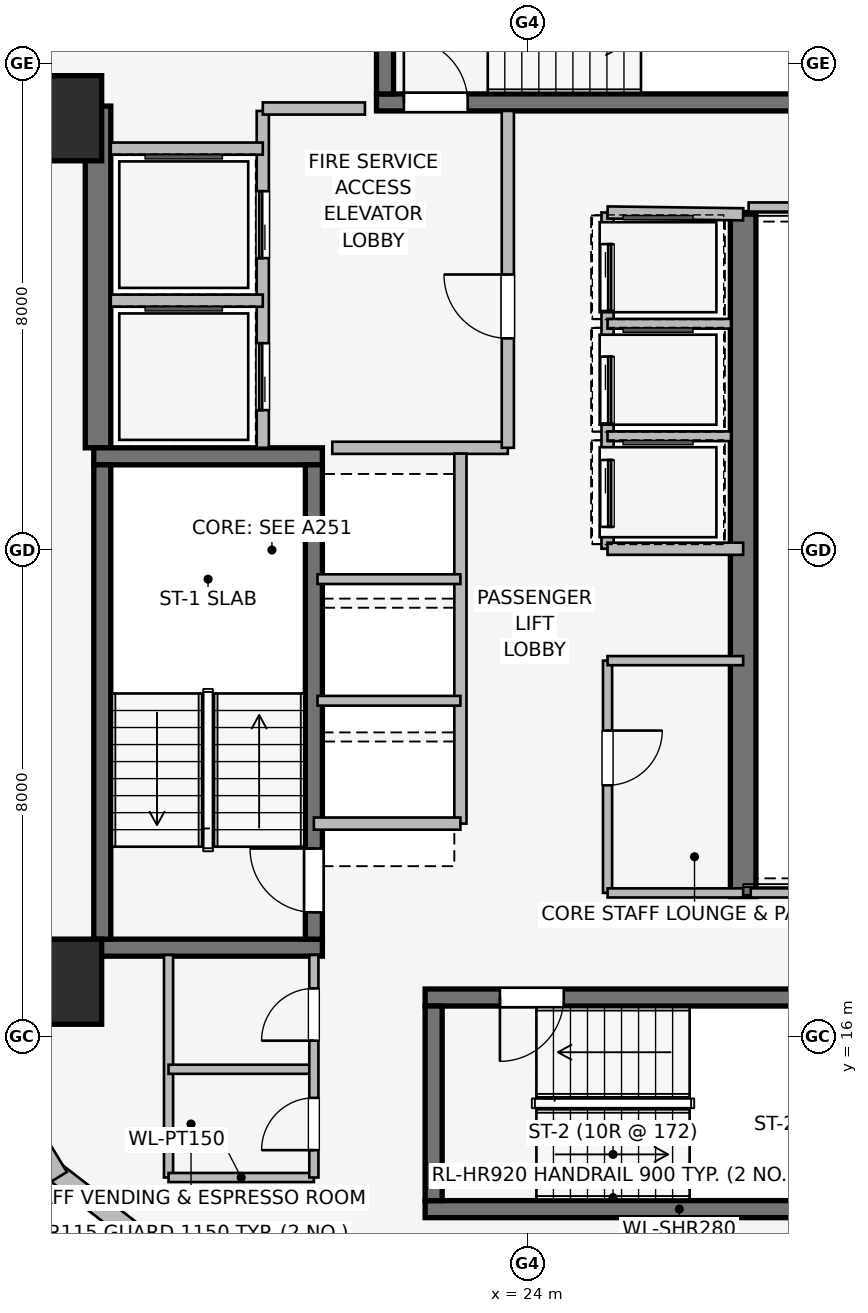
"""IFC4 building model, lengths in metres.
Left out: names, types, materials, properties, quantities, classifications, styles, units other than length and angle.
Written with IfcOpenShell. Run it as: python <this file> out.ifc"""

import sys

from ifc_helpers import new_model, si_unit, direction, frame, frame_2d, origin, origin_2d, place, context, subcontext, project, spatial, rectangle, extrude, element, fill, save


model = new_model("IFC4")
c1 = context("Model", 3, precision=1e-05, world=origin(), true_north=direction((0.0, 1.0)))
c2 = subcontext(c1, "Body", "Model", "MODEL_VIEW")
j1 = project(units=[si_unit("LENGTHUNIT", "METRE"), si_unit("PLANEANGLEUNIT", "RADIAN")], contexts=[c1])
p1 = place(None, origin())
s1 = spatial("IfcSite", under=j1, at=p1, CompositionType="ELEMENT")
p2 = place(p1, origin())
s2 = spatial("IfcBuilding", under=s1, at=p2, CompositionType="ELEMENT")
p3 = place(p2, frame((0.0, 0.0, 180.9)))
s3 = spatial("IfcBuildingStorey", under=s2, at=p3, CompositionType="ELEMENT", Elevation=180.9)
p4 = place(p3, frame((16.94, 25.68, 0.0), z_axis=(0.0, 0.0, 1.0), x_axis=(0.0, 1.0, 0.0)))
e1 = element("IfcWall", 1, at=p4, inside=s3, PredefinedType="SHEAR", context=c2, shape_type="SweptSolid", body=[
    extrude(rectangle(XDim=5.62, YDim=0.42, at=frame_2d((2.81, 0.0))), origin(), (0.0, 0.0, 1.0), 3.45),
])
p5 = place(p3, frame((27.55, 29.55, 0.0), z_axis=(0.0, 0.0, 1.0), x_axis=(0.0, -1.0, 0.0)))
e2 = element("IfcWall", 2, at=p5, inside=s3, PredefinedType="SHEAR", context=c2, shape_type="SweptSolid", body=[
    extrude(rectangle(XDim=11.25, YDim=0.42, at=frame_2d((5.625, 0.0))), origin(), (0.0, 0.0, 1.0), 3.45),
])
for number, where, z_axis, x_axis in (
    (3, (16.87, 17.46, 0.0), (0.0, 0.0, 1.0), (1.0, 0.0, 0.0)),
    (4, (20.63, 25.54, 0.0), (0.0, 0.0, 1.0), (-1.0, 0.0, 0.0)),
):
    element("IfcWall", number, at=place(p3, frame(where, z_axis=z_axis, x_axis=x_axis)), inside=s3, PredefinedType="SHEAR", context=c2, shape_type="SweptSolid", body=[
        extrude(rectangle(XDim=3.76, YDim=0.28, at=frame_2d((1.88, 0.0))), origin(), (0.0, 0.0, 1.0), 3.45),
    ])
p6 = place(p3, frame((17.01, 25.4, 0.0), z_axis=(0.0, 0.0, 1.0), x_axis=(0.0, -1.0, 0.0)))
e5 = element("IfcWall", 5, at=p6, inside=s3, PredefinedType="SHEAR", context=c2, shape_type="SweptSolid", body=[
    extrude(rectangle(XDim=7.8, YDim=0.28, at=frame_2d((3.9, 0.0))), origin(), (0.0, 0.0, 1.0), 3.45),
])
p7 = place(p3, frame((20.49, 17.6, 0.0), z_axis=(0.0, 0.0, 1.0), x_axis=(0.0, 1.0, 0.0)))
e6 = element("IfcWall", 6, at=p7, inside=s3, PredefinedType="SHEAR", context=c2, shape_type="SweptSolid", body=[
    extrude(rectangle(XDim=7.8, YDim=0.28, at=frame_2d((3.9, 0.0))), origin(), (0.0, 0.0, 1.0), 3.45),
])
p8 = place(p7, frame((0.44, 0.0, 0.0)))
e7 = element("IfcOpeningElement", 7, at=p8, cuts=e6, PredefinedType="OPENING", context=c2, shape_type="SweptSolid", body=[
    extrude(rectangle(XDim=1.05, YDim=2.0, at=frame_2d((0.525, 1.0))), frame((0.0, 0.15, 0.0), z_axis=(0.0, -1.0, 0.0), x_axis=(1.0, 0.0, 0.0)), (0.0, 0.0, 1.0), 0.3),
])
p9 = place(p3, frame((22.32, 13.16, 0.0), z_axis=(0.0, 0.0, 1.0), x_axis=(1.0, 0.0, 0.0)))
e8 = element("IfcWall", 8, at=p9, inside=s3, PredefinedType="SHEAR", context=c2, shape_type="SweptSolid", body=[
    extrude(rectangle(XDim=8.36, YDim=0.28, at=frame_2d((4.18, 0.0))), origin(), (0.0, 0.0, 1.0), 3.45),
])
p10 = place(p3, frame((30.68, 16.64, 0.0), z_axis=(0.0, 0.0, 1.0), x_axis=(-1.0, 0.0, 0.0)))
e9 = element("IfcWall", 9, at=p10, inside=s3, PredefinedType="SHEAR", context=c2, shape_type="SweptSolid", body=[
    extrude(rectangle(XDim=8.36, YDim=0.28, at=frame_2d((4.18, 0.0))), origin(), (0.0, 0.0, 1.0), 3.45),
])
p11 = place(p10, frame((6.08, 0.0, 0.0)))
e10 = element("IfcOpeningElement", 10, at=p11, cuts=e9, PredefinedType="OPENING", context=c2, shape_type="SweptSolid", body=[
    extrude(rectangle(XDim=1.05, YDim=2.0, at=frame_2d((0.525, 1.0))), frame((0.0, 0.15, 0.0), z_axis=(0.0, -1.0, 0.0), x_axis=(1.0, 0.0, 0.0)), (0.0, 0.0, 1.0), 0.3),
])
p12 = place(p3, frame((22.46, 16.5, 0.0), z_axis=(0.0, 0.0, 1.0), x_axis=(0.0, -1.0, 0.0)))
e11 = element("IfcWall", 11, at=p12, inside=s3, PredefinedType="SHEAR", context=c2, shape_type="SweptSolid", body=[
    extrude(rectangle(XDim=3.2, YDim=0.28, at=frame_2d((1.6, 0.0))), origin(), (0.0, 0.0, 1.0), 3.45),
])
p13 = place(p3, frame((21.52, 31.36, 0.0), z_axis=(0.0, 0.0, 1.0), x_axis=(1.0, 0.0, 0.0)))
e12 = element("IfcWall", 12, at=p13, inside=s3, PredefinedType="SHEAR", context=c2, shape_type="SweptSolid", body=[
    extrude(rectangle(XDim=8.36, YDim=0.28, at=frame_2d((4.18, 0.0))), origin(), (0.0, 0.0, 1.0), 3.45),
])
p14 = place(p13, frame((0.45, 0.0, 0.0)))
e13 = element("IfcOpeningElement", 13, at=p14, cuts=e12, PredefinedType="OPENING", context=c2, shape_type="SweptSolid", body=[
    extrude(rectangle(XDim=1.05, YDim=2.0, at=frame_2d((0.525, 1.0))), frame((0.0, 0.15, 0.0), z_axis=(0.0, -1.0, 0.0), x_axis=(1.0, 0.0, 0.0)), (0.0, 0.0, 1.0), 0.3),
])
p15 = place(p3, frame((21.66, 34.7, 0.0), z_axis=(0.0, 0.0, 1.0), x_axis=(0.0, -1.0, 0.0)))
e14 = element("IfcWall", 14, at=p15, inside=s3, PredefinedType="SHEAR", context=c2, shape_type="SweptSolid", body=[
    extrude(rectangle(XDim=3.2, YDim=0.28, at=frame_2d((1.6, 0.0))), origin(), (0.0, 0.0, 1.0), 3.45),
])
for number, where, z_axis, x_axis in (
    (15, (16.3, 16.9, 0.0), (0.0, 0.0, 1.0), (1.0, 0.0, 0.0)),
    (16, (16.3, 31.1, 0.0), (0.0, 0.0, 1.0), (1.0, 0.0, 0.0)),
):
    element("IfcColumn", number, at=place(p3, frame(where, z_axis=z_axis, x_axis=x_axis)), inside=s3, PredefinedType="COLUMN", context=c2, shape_type="SweptSolid", body=[
        extrude(rectangle(XDim=1.4, YDim=1.4, at=origin_2d()), origin(), (0.0, 0.0, 1.0), 3.45),
    ])
p16 = place(p3, frame((17.489, 12.8, 0.0), z_axis=(0.0, 0.0, 1.0), x_axis=(-0.791409877269, 0.611285862884, 0.0)))
e17 = element("IfcWall", 17, at=p16, inside=s3, PredefinedType="STANDARD", context=c2, shape_type="SweptSolid", body=[
    extrude(rectangle(XDim=1.677, YDim=0.33, at=frame_2d((0.838, 0.0))), origin(), (0.0, 0.0, 1.0), 3.19),
])
p17 = place(p3, frame((16.288, 13.685, 0.0), z_axis=(0.0, 0.0, 1.0), x_axis=(-0.520325409202, 0.853968072318, 0.0)))
e18 = element("IfcWall", 18, at=p17, inside=s3, PredefinedType="STANDARD", context=c2, shape_type="SweptSolid", body=[
    extrude(rectangle(XDim=1.678, YDim=0.33, at=frame_2d((0.839, 0.0))), origin(), (0.0, 0.0, 1.0), 3.19),
])
p18 = place(p3, frame((19.65, 25.68, 0.0), z_axis=(0.0, 0.0, 1.0), x_axis=(0.0, 1.0, 0.0)))
e19 = element("IfcWall", 19, at=p18, inside=s3, PredefinedType="PARTITIONING", context=c2, shape_type="SweptSolid", body=[
    extrude(rectangle(XDim=5.54, YDim=0.2, at=frame_2d((2.77, 0.0))), origin(), (0.0, 0.0, 1.0), 3.19),
])
p19 = place(p18, frame((0.62, 0.0, 0.0)))
e20 = element("IfcOpeningElement", 20, at=p19, cuts=e19, PredefinedType="OPENING", context=c2, shape_type="SweptSolid", body=[
    extrude(rectangle(XDim=1.1, YDim=2.2, at=frame_2d((0.55, 1.1))), frame((0.0, 0.11, 0.0), z_axis=(0.0, -1.0, 0.0), x_axis=(1.0, 0.0, 0.0)), (0.0, 0.0, 1.0), 0.22),
])
p20 = place(p18, frame((3.12, 0.0, 0.0)))
e21 = element("IfcOpeningElement", 21, at=p20, cuts=e19, PredefinedType="OPENING", context=c2, shape_type="SweptSolid", body=[
    extrude(rectangle(XDim=1.1, YDim=2.2, at=frame_2d((0.55, 1.1))), frame((0.0, 0.11, 0.0), z_axis=(0.0, -1.0, 0.0), x_axis=(1.0, 0.0, 0.0)), (0.0, 0.0, 1.0), 0.22),
])
p21 = place(p3, frame((20.793, 25.68, 0.0), z_axis=(0.0, 0.0, 1.0), x_axis=(1.0, 0.0, 0.0)))
e22 = element("IfcWall", 22, at=p21, inside=s3, PredefinedType="PARTITIONING", context=c2, shape_type="SweptSolid", body=[
    extrude(rectangle(XDim=2.887, YDim=0.2, at=frame_2d((1.443, 0.0))), origin(), (0.0, 0.0, 1.0), 3.19),
])
p22 = place(p3, frame((23.68, 25.68, 0.0), z_axis=(0.0, 0.0, 1.0), x_axis=(0.0, 1.0, 0.0)))
e23 = element("IfcWall", 23, at=p22, inside=s3, PredefinedType="PARTITIONING", context=c2, shape_type="SweptSolid", body=[
    extrude(rectangle(XDim=5.54, YDim=0.2, at=frame_2d((2.77, 0.0))), origin(), (0.0, 0.0, 1.0), 3.19),
])
p23 = place(p22, frame((1.8, 0.0, 0.0)))
e24 = element("IfcOpeningElement", 24, at=p23, cuts=e23, PredefinedType="OPENING", context=c2, shape_type="SweptSolid", body=[
    extrude(rectangle(XDim=1.05, YDim=2.0, at=frame_2d((0.525, 1.0))), frame((0.0, 0.11, 0.0), z_axis=(0.0, -1.0, 0.0), x_axis=(1.0, 0.0, 0.0)), (0.0, 0.0, 1.0), 0.22),
])
p24 = place(p3, frame((21.33, 31.26, 0.0), z_axis=(0.0, 0.0, 1.0), x_axis=(-1.0, 0.0, 0.0)))
e25 = element("IfcWall", 25, at=p24, inside=s3, PredefinedType="PARTITIONING", context=c2, shape_type="SweptSolid", body=[
    extrude(rectangle(XDim=1.68, YDim=0.2, at=frame_2d((0.84, 0.0))), origin(), (0.0, 0.0, 1.0), 3.19),
])
p25 = place(p3, frame((17.15, 28.1, 0.0), z_axis=(0.0, 0.0, 1.0), x_axis=(1.0, 0.0, 0.0)))
e26 = element("IfcWall", 26, at=p25, inside=s3, PredefinedType="PARTITIONING", context=c2, shape_type="SweptSolid", body=[
    extrude(rectangle(XDim=2.5, YDim=0.2, at=frame_2d((1.25, 0.0))), origin(), (0.0, 0.0, 1.0), 3.19),
])
p26 = place(p3, frame((19.65, 30.6, 0.0), z_axis=(0.0, 0.0, 1.0), x_axis=(-1.0, 0.0, 0.0)))
e27 = element("IfcWall", 27, at=p26, inside=s3, PredefinedType="PARTITIONING", context=c2, shape_type="SweptSolid", body=[
    extrude(rectangle(XDim=2.5, YDim=0.2, at=frame_2d((1.25, 0.0))), origin(), (0.0, 0.0, 1.0), 2.09),
])
p27 = place(p3, frame((22.9, 19.5, 0.0), z_axis=(0.0, 0.0, 1.0), x_axis=(0.0, 1.0, 0.0)))
e28 = element("IfcWall", 28, at=p27, inside=s3, PredefinedType="PARTITIONING", context=c2, shape_type="SweptSolid", body=[
    extrude(rectangle(XDim=6.085, YDim=0.2, at=frame_2d((3.042, 0.0))), origin(), (0.0, 0.0, 1.0), 3.19),
])
p28 = place(p3, frame((20.49, 19.5, 0.0), z_axis=(0.0, 0.0, 1.0), x_axis=(1.0, 0.0, 0.0)))
e29 = element("IfcWall", 29, at=p28, inside=s3, PredefinedType="PARTITIONING", context=c2, shape_type="SweptSolid", body=[
    extrude(rectangle(XDim=2.41, YDim=0.2, at=frame_2d((1.205, 0.0))), origin(), (0.0, 0.0, 1.0), 2.09),
])
for number, where, z_axis, x_axis in (
    (30, (20.55, 21.52, 0.0), (0.0, 0.0, 1.0), (1.0, 0.0, 0.0)),
    (31, (20.55, 23.52, 0.0), (0.0, 0.0, 1.0), (1.0, 0.0, 0.0)),
):
    element("IfcWall", number, at=place(p3, frame(where, z_axis=z_axis, x_axis=x_axis)), inside=s3, PredefinedType="PARTITIONING", context=c2, shape_type="SweptSolid", body=[
        extrude(rectangle(XDim=2.35, YDim=0.16, at=frame_2d((1.175, 0.0))), origin(), (0.0, 0.0, 1.0), 3.19),
    ])
p29 = place(p3, frame((25.32, 29.55, 0.0), z_axis=(0.0, 0.0, 1.0), x_axis=(0.0, -1.0, 0.0)))
e32 = element("IfcWall", 32, at=p29, inside=s3, PredefinedType="PARTITIONING", context=c2, shape_type="SweptSolid", body=[
    extrude(rectangle(XDim=5.53, YDim=0.2, at=frame_2d((2.765, 0.0))), origin(), (0.0, 0.0, 1.0), 3.19),
])
p30 = place(p29, frame((0.52, 0.0, 0.0)))
e33 = element("IfcOpeningElement", 33, at=p30, cuts=e32, PredefinedType="OPENING", context=c2, shape_type="SweptSolid", body=[
    extrude(rectangle(XDim=1.1, YDim=2.2, at=frame_2d((0.55, 1.1))), frame((0.0, 0.11, 0.0), z_axis=(0.0, -1.0, 0.0), x_axis=(1.0, 0.0, 0.0)), (0.0, 0.0, 1.0), 0.22),
])
p31 = place(p29, frame((2.37, 0.0, 0.0)))
e34 = element("IfcOpeningElement", 34, at=p31, cuts=e32, PredefinedType="OPENING", context=c2, shape_type="SweptSolid", body=[
    extrude(rectangle(XDim=1.1, YDim=2.2, at=frame_2d((0.55, 1.1))), frame((0.0, 0.11, 0.0), z_axis=(0.0, -1.0, 0.0), x_axis=(1.0, 0.0, 0.0)), (0.0, 0.0, 1.0), 0.22),
])
p32 = place(p29, frame((4.07, 0.0, 0.0)))
e35 = element("IfcOpeningElement", 35, at=p32, cuts=e32, PredefinedType="OPENING", context=c2, shape_type="SweptSolid", body=[
    extrude(rectangle(XDim=1.1, YDim=2.2, at=frame_2d((0.55, 1.1))), frame((0.0, 0.11, 0.0), z_axis=(0.0, -1.0, 0.0), x_axis=(1.0, 0.0, 0.0)), (0.0, 0.0, 1.0), 0.22),
])
p33 = place(p3, frame((27.55, 29.52, 0.0), z_axis=(0.0, 0.0, 1.0), x_axis=(-0.999909343457, 0.013464949556, 0.0)))
e36 = element("IfcWall", 36, at=p33, inside=s3, PredefinedType="PARTITIONING", context=c2, shape_type="SweptSolid", body=[
    extrude(rectangle(XDim=2.23, YDim=0.2, at=frame_2d((1.115, 0.0))), origin(), (0.0, 0.0, 1.0), 2.09),
])
p34 = place(p3, frame((25.32, 24.02, 0.0), z_axis=(0.0, 0.0, 1.0), x_axis=(1.0, 0.0, 0.0)))
e37 = element("IfcWall", 37, at=p34, inside=s3, PredefinedType="PARTITIONING", context=c2, shape_type="SweptSolid", body=[
    extrude(rectangle(XDim=2.23, YDim=0.2, at=frame_2d((1.115, 0.0))), origin(), (0.0, 0.0, 1.0), 3.19),
])
for number, where, z_axis, x_axis in (
    (38, (25.32, 25.87, 0.0), (0.0, 0.0, 1.0), (1.0, 0.0, 0.0)),
    (39, (25.32, 27.72, 0.0), (0.0, 0.0, 1.0), (1.0, 0.0, 0.0)),
):
    element("IfcWall", number, at=place(p3, frame(where, z_axis=z_axis, x_axis=x_axis)), inside=s3, PredefinedType="PARTITIONING", context=c2, shape_type="SweptSolid", body=[
        extrude(rectangle(XDim=2.03, YDim=0.16, at=frame_2d((1.015, 0.0))), origin(), (0.0, 0.0, 1.0), 3.19),
    ])
p35 = place(p3, frame((25.32, 22.18, 0.0), z_axis=(0.0, 0.0, 1.0), x_axis=(0.0, -1.0, 0.0)))
e40 = element("IfcWall", 40, at=p35, inside=s3, PredefinedType="PARTITIONING", context=c2, shape_type="SweptSolid", body=[
    extrude(rectangle(XDim=3.82, YDim=0.15, at=frame_2d((1.91, 0.0))), origin(), (0.0, 0.0, 1.0), 3.19),
])
p36 = place(p35, frame((1.15, 0.0, 0.0)))
e41 = element("IfcOpeningElement", 41, at=p36, cuts=e40, PredefinedType="OPENING", context=c2, shape_type="SweptSolid", body=[
    extrude(rectangle(XDim=0.9, YDim=2.0, at=frame_2d((0.45, 1.0))), frame((0.0, 0.085, 0.0), z_axis=(0.0, -1.0, 0.0), x_axis=(1.0, 0.0, 0.0)), (0.0, 0.0, 1.0), 0.17),
])
for number, where, z_axis, x_axis in (
    (42, (25.32, 22.18, 0.0), (0.0, 0.0, 1.0), (1.0, 0.0, 0.0)),
    (43, (25.32, 18.36, 0.0), (0.0, 0.0, 1.0), (1.0, 0.0, 0.0)),
):
    element("IfcWall", number, at=place(p3, frame(where, z_axis=z_axis, x_axis=x_axis)), inside=s3, PredefinedType="PARTITIONING", context=c2, shape_type="SweptSolid", body=[
        extrude(rectangle(XDim=2.23, YDim=0.15, at=frame_2d((1.115, 0.0))), origin(), (0.0, 0.0, 1.0), 3.19),
    ])
p37 = place(p3, frame((18.1, 17.34, 0.0), z_axis=(0.0, 0.0, 1.0), x_axis=(0.0, -1.0, 0.0)))
e44 = element("IfcWall", 44, at=p37, inside=s3, PredefinedType="PARTITIONING", context=c2, shape_type="SweptSolid", body=[
    extrude(rectangle(XDim=3.66, YDim=0.15, at=frame_2d((1.83, 0.0))), origin(), (0.0, 0.0, 1.0), 3.19),
])
for number, where, z_axis, x_axis in (
    (45, (18.1, 13.68, 0.0), (0.0, 0.0, 1.0), (1.0, 0.0, 0.0)),
    (46, (18.1, 15.46, 0.0), (0.0, 0.0, 1.0), (1.0, 0.0, 0.0)),
):
    element("IfcWall", number, at=place(p3, frame(where, z_axis=z_axis, x_axis=x_axis)), inside=s3, PredefinedType="PARTITIONING", context=c2, shape_type="SweptSolid", body=[
        extrude(rectangle(XDim=2.39, YDim=0.15, at=frame_2d((1.195, 0.0))), origin(), (0.0, 0.0, 1.0), 3.19),
    ])
p38 = place(p3, frame((20.49, 13.68, 0.0), z_axis=(0.0, 0.0, 1.0), x_axis=(0.0, 1.0, 0.0)))
e47 = element("IfcWall", 47, at=p38, inside=s3, PredefinedType="PARTITIONING", context=c2, shape_type="SweptSolid", body=[
    extrude(rectangle(XDim=3.66, YDim=0.15, at=frame_2d((1.83, 0.0))), origin(), (0.0, 0.0, 1.0), 3.19),
])
p39 = place(p38, frame((0.45, 0.0, 0.0)))
e48 = element("IfcOpeningElement", 48, at=p39, cuts=e47, PredefinedType="OPENING", context=c2, shape_type="SweptSolid", body=[
    extrude(rectangle(XDim=0.86, YDim=2.0, at=frame_2d((0.43, 1.0))), frame((0.0, 0.085, 0.0), z_axis=(0.0, -1.0, 0.0), x_axis=(1.0, 0.0, 0.0)), (0.0, 0.0, 1.0), 0.17),
])
p40 = place(p38, frame((2.25, 0.0, 0.0)))
e49 = element("IfcOpeningElement", 49, at=p40, cuts=e47, PredefinedType="OPENING", context=c2, shape_type="SweptSolid", body=[
    extrude(rectangle(XDim=0.86, YDim=2.0, at=frame_2d((0.43, 1.0))), frame((0.0, 0.085, 0.0), z_axis=(0.0, -1.0, 0.0), x_axis=(1.0, 0.0, 0.0)), (0.0, 0.0, 1.0), 0.17),
])
p41 = place(p3, frame((27.675, 18.36, 0.0), z_axis=(0.0, 0.0, 1.0), x_axis=(1.0, 0.0, 0.0)))
e50 = element("IfcWall", 50, at=p41, inside=s3, PredefinedType="PARTITIONING", context=c2, shape_type="SweptSolid", body=[
    extrude(rectangle(XDim=12.165, YDim=0.15, at=frame_2d((6.083, 0.0))), origin(), (0.0, 0.0, 1.0), 2.331),
])
p42 = place(p3, frame((39.84, 29.64, 0.0), z_axis=(0.0, 0.0, 1.0), x_axis=(-1.0, 0.0, 0.0)))
e51 = element("IfcWall", 51, at=p42, inside=s3, PredefinedType="PARTITIONING", context=c2, shape_type="SweptSolid", body=[
    extrude(rectangle(XDim=12.2, YDim=0.15, at=frame_2d((6.1, 0.0))), origin(), (0.0, 0.0, 1.0), 2.331),
])
p43 = place(p8, origin())
e52 = element("IfcDoor", 52, at=p43, inside=s3, OperationType="SINGLE_SWING_RIGHT", PredefinedType="DOOR", context=c2, shape_type="SweptSolid", body=[
    extrude(rectangle(XDim=1.05, YDim=2.0, at=frame_2d((0.525, 1.0))), frame((0.0, 0.025, 0.0), z_axis=(0.0, -1.0, 0.0), x_axis=(1.0, 0.0, 0.0)), (0.0, 0.0, 1.0), 0.05),
])
fill(e7, e52)
p44 = place(p11, origin())
e53 = element("IfcDoor", 53, at=p44, inside=s3, OperationType="SINGLE_SWING_RIGHT", PredefinedType="DOOR", context=c2, shape_type="SweptSolid", body=[
    extrude(rectangle(XDim=1.05, YDim=2.0, at=frame_2d((0.525, 1.0))), frame((0.0, 0.025, 0.0), z_axis=(0.0, -1.0, 0.0), x_axis=(1.0, 0.0, 0.0)), (0.0, 0.0, 1.0), 0.05),
])
fill(e10, e53)
p45 = place(p14, origin())
e54 = element("IfcDoor", 54, at=p45, inside=s3, OperationType="SINGLE_SWING_LEFT", PredefinedType="DOOR", context=c2, shape_type="SweptSolid", body=[
    extrude(rectangle(XDim=1.05, YDim=2.0, at=frame_2d((0.525, 1.0))), frame((0.0, 0.025, 0.0), z_axis=(0.0, -1.0, 0.0), x_axis=(1.0, 0.0, 0.0)), (0.0, 0.0, 1.0), 0.05),
])
fill(e13, e54)
p46 = place(p19, origin())
e55 = element("IfcDoor", 55, at=p46, inside=s3, OperationType="SLIDING_TO_LEFT", PredefinedType="DOOR", context=c2, shape_type="SweptSolid", body=[
    extrude(rectangle(XDim=1.1, YDim=2.2, at=frame_2d((0.55, 1.1))), frame((0.0, 0.025, 0.0), z_axis=(0.0, -1.0, 0.0), x_axis=(1.0, 0.0, 0.0)), (0.0, 0.0, 1.0), 0.05),
])
fill(e20, e55)
p47 = place(p20, origin())
e56 = element("IfcDoor", 56, at=p47, inside=s3, OperationType="SLIDING_TO_LEFT", PredefinedType="DOOR", context=c2, shape_type="SweptSolid", body=[
    extrude(rectangle(XDim=1.1, YDim=2.2, at=frame_2d((0.55, 1.1))), frame((0.0, 0.025, 0.0), z_axis=(0.0, -1.0, 0.0), x_axis=(1.0, 0.0, 0.0)), (0.0, 0.0, 1.0), 0.05),
])
fill(e21, e56)
p48 = place(p23, origin())
e57 = element("IfcDoor", 57, at=p48, inside=s3, OperationType="SINGLE_SWING_RIGHT", PredefinedType="DOOR", context=c2, shape_type="SweptSolid", body=[
    extrude(rectangle(XDim=1.05, YDim=2.0, at=frame_2d((0.525, 1.0))), frame((0.0, 0.025, 0.0), z_axis=(0.0, -1.0, 0.0), x_axis=(1.0, 0.0, 0.0)), (0.0, 0.0, 1.0), 0.05),
])
fill(e24, e57)
p49 = place(p30, origin())
e58 = element("IfcDoor", 58, at=p49, inside=s3, OperationType="SLIDING_TO_LEFT", PredefinedType="DOOR", context=c2, shape_type="SweptSolid", body=[
    extrude(rectangle(XDim=1.1, YDim=2.2, at=frame_2d((0.55, 1.1))), frame((0.0, 0.025, 0.0), z_axis=(0.0, -1.0, 0.0), x_axis=(1.0, 0.0, 0.0)), (0.0, 0.0, 1.0), 0.05),
])
fill(e33, e58)
p50 = place(p31, origin())
e59 = element("IfcDoor", 59, at=p50, inside=s3, OperationType="SLIDING_TO_LEFT", PredefinedType="DOOR", context=c2, shape_type="SweptSolid", body=[
    extrude(rectangle(XDim=1.1, YDim=2.2, at=frame_2d((0.55, 1.1))), frame((0.0, 0.025, 0.0), z_axis=(0.0, -1.0, 0.0), x_axis=(1.0, 0.0, 0.0)), (0.0, 0.0, 1.0), 0.05),
])
fill(e34, e59)
p51 = place(p32, origin())
e60 = element("IfcDoor", 60, at=p51, inside=s3, OperationType="SLIDING_TO_LEFT", PredefinedType="DOOR", context=c2, shape_type="SweptSolid", body=[
    extrude(rectangle(XDim=1.1, YDim=2.2, at=frame_2d((0.55, 1.1))), frame((0.0, 0.025, 0.0), z_axis=(0.0, -1.0, 0.0), x_axis=(1.0, 0.0, 0.0)), (0.0, 0.0, 1.0), 0.05),
])
fill(e35, e60)
p52 = place(p36, origin())
e61 = element("IfcDoor", 61, at=p52, inside=s3, OperationType="SINGLE_SWING_LEFT", PredefinedType="DOOR", context=c2, shape_type="SweptSolid", body=[
    extrude(rectangle(XDim=0.9, YDim=2.0, at=frame_2d((0.45, 1.0))), frame((0.0, 0.025, 0.0), z_axis=(0.0, -1.0, 0.0), x_axis=(1.0, 0.0, 0.0)), (0.0, 0.0, 1.0), 0.05),
])
fill(e41, e61)
p53 = place(p39, origin())
e62 = element("IfcDoor", 62, at=p53, inside=s3, OperationType="SINGLE_SWING_LEFT", PredefinedType="DOOR", context=c2, shape_type="SweptSolid", body=[
    extrude(rectangle(XDim=0.86, YDim=2.0, at=frame_2d((0.43, 1.0))), frame((0.0, 0.025, 0.0), z_axis=(0.0, -1.0, 0.0), x_axis=(1.0, 0.0, 0.0)), (0.0, 0.0, 1.0), 0.05),
])
fill(e48, e62)
p54 = place(p40, origin())
e63 = element("IfcDoor", 63, at=p54, inside=s3, OperationType="SINGLE_SWING_LEFT", PredefinedType="DOOR", context=c2, shape_type="SweptSolid", body=[
    extrude(rectangle(XDim=0.86, YDim=2.0, at=frame_2d((0.43, 1.0))), frame((0.0, 0.025, 0.0), z_axis=(0.0, -1.0, 0.0), x_axis=(1.0, 0.0, 0.0)), (0.0, 0.0, 1.0), 0.05),
])
fill(e49, e63)
save(model, sys.argv[1])
